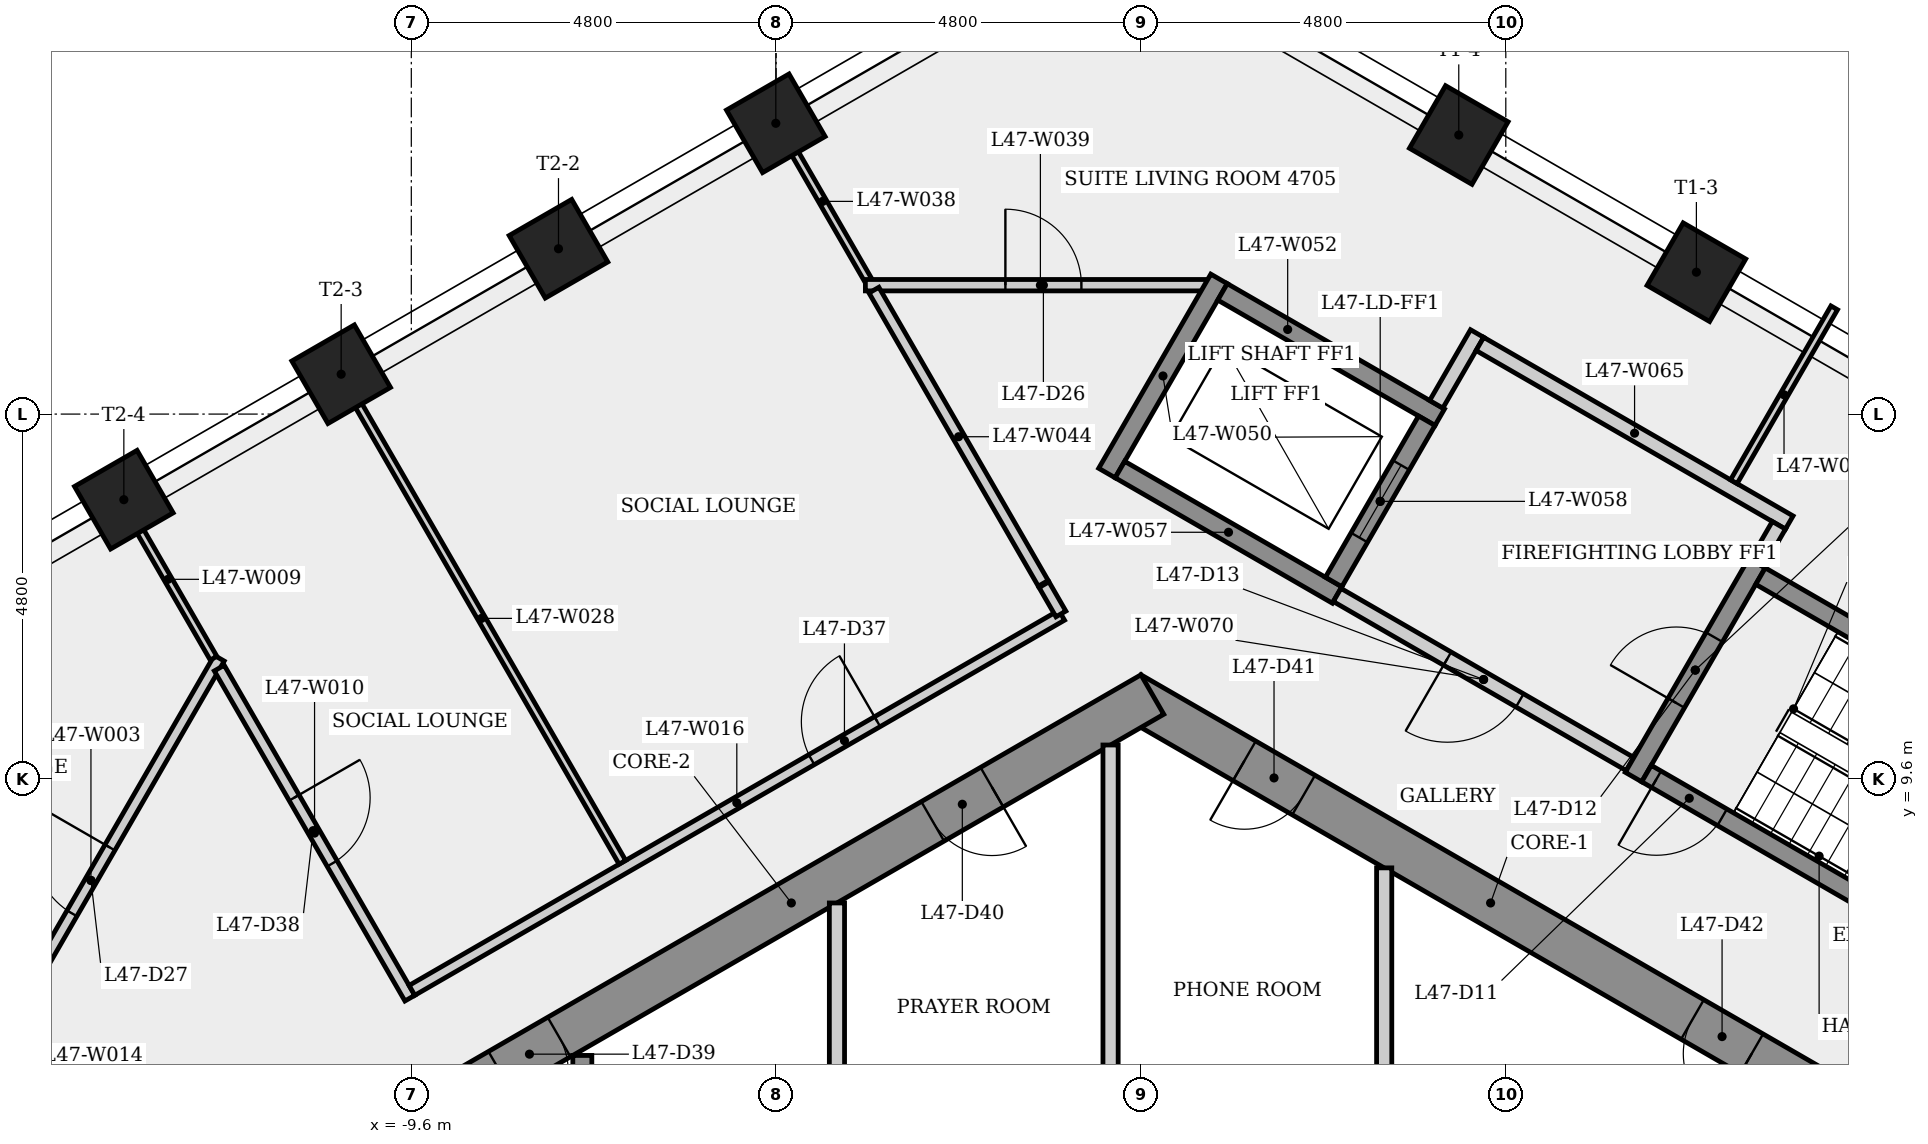
"""IFC4 building model, lengths in metres.
Left out: names, types, materials, properties, quantities, classifications, styles, units other than length and angle.
Written with IfcOpenShell. Run it as: python <this file> out.ifc"""

import sys

from ifc_helpers import new_model, si_unit, direction, frame, frame_2d, origin, origin_2d, place, context, subcontext, project, spatial, rectangle, extrude, element, fill, save


model = new_model("IFC4")
c1 = context("Model", 3, precision=1e-05, world=origin(), true_north=direction((0.0, 1.0)))
c2 = subcontext(c1, "Body", "Model", "MODEL_VIEW")
j1 = project(units=[si_unit("LENGTHUNIT", "METRE"), si_unit("PLANEANGLEUNIT", "RADIAN")], contexts=[c1])
p1 = place(None, origin())
s1 = spatial("IfcSite", under=j1, at=p1, CompositionType="ELEMENT")
p2 = place(p1, origin())
s2 = spatial("IfcBuilding", under=s1, at=p2, CompositionType="ELEMENT")
p3 = place(p2, frame((0.0, 0.0, 176.5)))
s3 = spatial("IfcBuildingStorey", under=s2, at=p3, CompositionType="ELEMENT", Elevation=176.5)
p4 = place(p3, frame((9.35, 5.225, 0.0), z_axis=(0.0, 0.0, 1.0), x_axis=(-0.866023993627, 0.500002442456, 0.0)))
e1 = element("IfcWall", 1, at=p4, inside=s3, PredefinedType="SHEAR", context=c2, shape_type="SweptSolid", body=[
    extrude(rectangle(XDim=10.97, YDim=0.6, at=frame_2d((5.485, 0.0))), origin(), (0.0, 0.0, 1.0), 3.4),
])
p5 = place(p4, frame((8.325, 0.0, 0.0)))
e2 = element("IfcOpeningElement", 2, at=p5, cuts=e1, PredefinedType="OPENING", context=c2, shape_type="SweptSolid", body=[
    extrude(rectangle(XDim=0.9, YDim=2.1, at=frame_2d((0.45, 1.05))), frame((0.0, 0.31, 0.0), z_axis=(0.0, -1.0, 0.0), x_axis=(1.0, 0.0, 0.0)), (0.0, 0.0, 1.0), 0.62),
])
p6 = place(p4, frame((1.518, 0.0, 0.0)))
e3 = element("IfcOpeningElement", 3, at=p6, cuts=e1, PredefinedType="OPENING", context=c2, shape_type="SweptSolid", body=[
    extrude(rectangle(XDim=0.9, YDim=2.1, at=frame_2d((0.45, 1.05))), frame((0.0, 0.31, 0.0), z_axis=(0.0, -1.0, 0.0), x_axis=(1.0, 0.0, 0.0)), (0.0, 0.0, 1.0), 0.62),
])
p7 = place(p3, frame((0.15, 10.71, 0.0), z_axis=(0.0, 0.0, 1.0), x_axis=(-0.866023993627, -0.500002442456, 0.0)))
e4 = element("IfcWall", 4, at=p7, inside=s3, PredefinedType="SHEAR", context=c2, shape_type="SweptSolid", body=[
    extrude(rectangle(XDim=10.97, YDim=0.6, at=frame_2d((5.485, 0.0))), origin(), (0.0, 0.0, 1.0), 3.4),
])
p8 = place(p7, frame((9.013, 0.0, 0.0)))
e5 = element("IfcOpeningElement", 5, at=p8, cuts=e4, PredefinedType="OPENING", context=c2, shape_type="SweptSolid", body=[
    extrude(rectangle(XDim=0.9, YDim=2.1, at=frame_2d((0.45, 1.05))), frame((0.0, 0.31, 0.0), z_axis=(0.0, -1.0, 0.0), x_axis=(1.0, 0.0, 0.0)), (0.0, 0.0, 1.0), 0.62),
])
p9 = place(p7, frame((2.437, 0.0, 0.0)))
e6 = element("IfcOpeningElement", 6, at=p9, cuts=e4, PredefinedType="OPENING", context=c2, shape_type="SweptSolid", body=[
    extrude(rectangle(XDim=0.9, YDim=2.1, at=frame_2d((0.45, 1.05))), frame((0.0, 0.31, 0.0), z_axis=(0.0, -1.0, 0.0), x_axis=(1.0, 0.0, 0.0)), (0.0, 0.0, 1.0), 0.62),
])
for number, where, z_axis, x_axis in (
    (7, (7.308, 16.267, 0.0), (0.0, 0.0, 1.0), (0.5, 0.866, 0.0)),
    (8, (4.181, 18.072, 0.0), (0.0, 0.0, 1.0), (0.5, 0.866, 0.0)),
    (9, (-4.804, 18.226, 0.0), (0.0, 0.0, 1.0), (-0.5, 0.866, 0.0)),
    (10, (-7.664, 16.575, 0.0), (0.0, 0.0, 1.0), (-0.5, 0.866, 0.0)),
    (11, (-10.523, 14.925, 0.0), (0.0, 0.0, 1.0), (-0.5, 0.866, 0.0)),
    (12, (-13.382, 13.274, 0.0), (0.0, 0.0, 1.0), (-0.5, 0.866, 0.0)),
):
    element("IfcColumn", number, at=place(p3, frame(where, z_axis=z_axis, x_axis=x_axis)), inside=s3, PredefinedType="COLUMN", context=c2, shape_type="SweptSolid", body=[
        extrude(rectangle(XDim=0.95, YDim=0.95, at=origin_2d()), origin(), (0.0, 0.0, 1.0), 3.4),
    ])
p10 = place(p3, frame((-15.503, 5.34, 0.0), z_axis=(0.0, 0.0, 1.0), x_axis=(0.499988457423, 0.866032067792, 0.0)))
e13 = element("IfcWall", 13, at=p10, inside=s3, PredefinedType="PARTITIONING", context=c2, shape_type="SweptSolid", body=[
    extrude(rectangle(XDim=6.753, YDim=0.15, at=frame_2d((3.376, 0.0))), origin(), (0.0, 0.0, 1.0), 3.05),
])
p11 = place(p10, frame((2.876, 0.0, 0.0)))
e14 = element("IfcOpeningElement", 14, at=p11, cuts=e13, PredefinedType="OPENING", context=c2, shape_type="SweptSolid", body=[
    extrude(rectangle(XDim=1.0, YDim=2.1, at=frame_2d((0.5, 1.05))), frame((0.0, 0.085, 0.0), z_axis=(0.0, -1.0, 0.0), x_axis=(1.0, 0.0, 0.0)), (0.0, 0.0, 1.0), 0.17),
])
p12 = place(p3, frame((-13.4, 13.263, 0.0), z_axis=(0.0, 0.0, 1.0), x_axis=(0.499995825336, -0.866027814014, 0.0)))
e15 = element("IfcWall", 15, at=p12, inside=s3, PredefinedType="PARTITIONING", context=c2, shape_type="SweptSolid", body=[
    extrude(rectangle(XDim=2.396, YDim=0.1, at=frame_2d((1.198, 0.0))), origin(), (0.0, 0.0, 1.0), 3.05),
])
p13 = place(p3, frame((-12.127, 11.058, 0.0), z_axis=(0.0, 0.0, 1.0), x_axis=(0.500018842284, -0.866014524914, 0.0)))
e16 = element("IfcWall", 16, at=p13, inside=s3, PredefinedType="PARTITIONING", context=c2, shape_type="SweptSolid", body=[
    extrude(rectangle(XDim=5.015, YDim=0.15, at=frame_2d((2.507, 0.0))), origin(), (0.0, 0.0, 1.0), 3.05),
])
p14 = place(p13, frame((1.97, 0.0, 0.0)))
e17 = element("IfcOpeningElement", 17, at=p14, cuts=e16, PredefinedType="OPENING", context=c2, shape_type="SweptSolid", body=[
    extrude(rectangle(XDim=1.0, YDim=2.1, at=frame_2d((0.5, 1.05))), frame((0.0, 0.085, 0.0), z_axis=(0.0, -1.0, 0.0), x_axis=(1.0, 0.0, 0.0)), (0.0, 0.0, 1.0), 0.17),
])
p15 = place(p3, frame((-9.592, 6.817, 0.0), z_axis=(0.0, 0.0, 1.0), x_axis=(0.866024543535, 0.500001489993, 0.0)))
e18 = element("IfcWall", 18, at=p15, inside=s3, PredefinedType="PARTITIONING", context=c2, shape_type="SweptSolid", body=[
    extrude(rectangle(XDim=9.871, YDim=0.15, at=frame_2d((4.936, 0.0))), origin(), (0.0, 0.0, 1.0), 3.05),
])
p16 = place(p15, frame((6.071, 0.0, 0.0)))
e19 = element("IfcOpeningElement", 19, at=p16, cuts=e18, PredefinedType="OPENING", context=c2, shape_type="SweptSolid", body=[
    extrude(rectangle(XDim=1.0, YDim=2.1, at=frame_2d((0.5, 1.05))), frame((0.0, 0.085, 0.0), z_axis=(0.0, -1.0, 0.0), x_axis=(1.0, 0.0, 0.0)), (0.0, 0.0, 1.0), 0.17),
])
p17 = place(p3, frame((-7.35, 1.925, 0.0), z_axis=(0.0, 0.0, 1.0), x_axis=(0.0, 1.0, 0.0)))
e20 = element("IfcWall", 20, at=p17, inside=s3, PredefinedType="SHEAR", context=c2, shape_type="SweptSolid", body=[
    extrude(rectangle(XDim=4.036, YDim=0.25, at=frame_2d((2.018, 0.0))), origin(), (0.0, 0.0, 1.0), 3.05),
])
p18 = place(p3, frame((-6.823, 8.503, 0.0), z_axis=(0.0, 0.0, 1.0), x_axis=(-0.500011399757, 0.866018822032, 0.0)))
e21 = element("IfcWall", 21, at=p18, inside=s3, PredefinedType="PARTITIONING", context=c2, shape_type="SweptSolid", body=[
    extrude(rectangle(XDim=7.411, YDim=0.1, at=frame_2d((3.706, 0.0))), origin(), (0.0, 0.0, 1.0), 3.05),
])
p19 = place(p3, frame((-4.0, 7.967, 0.0), z_axis=(0.0, 0.0, 1.0), x_axis=(0.0, -1.0, 0.0)))
e22 = element("IfcWall", 22, at=p19, inside=s3, PredefinedType="PARTITIONING", context=c2, shape_type="SweptSolid", body=[
    extrude(rectangle(XDim=2.692, YDim=0.2, at=frame_2d((1.346, 0.0))), origin(), (0.0, 0.0, 1.0), 3.05),
])
p20 = place(p3, frame((-3.588, 16.161, 0.0), z_axis=(0.0, 0.0, 1.0), x_axis=(-0.499951716245, 0.866053278629, 0.0)))
e23 = element("IfcWall", 23, at=p20, inside=s3, PredefinedType="PARTITIONING", context=c2, shape_type="SweptSolid", body=[
    extrude(rectangle(XDim=2.397, YDim=0.1, at=frame_2d((1.198, 0.0))), origin(), (0.0, 0.0, 1.0), 3.05),
])
p21 = place(p3, frame((-3.626, 16.096, 0.0), z_axis=(0.0, 0.0, 1.0), x_axis=(1.0, 0.0, 0.0)))
e24 = element("IfcWall", 24, at=p21, inside=s3, PredefinedType="PARTITIONING", context=c2, shape_type="SweptSolid", body=[
    extrude(rectangle(XDim=4.605, YDim=0.15, at=frame_2d((2.302, 0.0))), origin(), (0.0, 0.0, 1.0), 3.05),
])
p22 = place(p21, frame((1.842, 0.0, 0.0)))
e25 = element("IfcOpeningElement", 25, at=p22, cuts=e24, PredefinedType="OPENING", context=c2, shape_type="SweptSolid", body=[
    extrude(rectangle(XDim=1.0, YDim=2.1, at=frame_2d((0.5, 1.05))), frame((0.0, 0.085, 0.0), z_axis=(0.0, -1.0, 0.0), x_axis=(1.0, 0.0, 0.0)), (0.0, 0.0, 1.0), 0.17),
])
p23 = place(p3, frame((-1.286, 12.173, 0.0), z_axis=(0.0, 0.0, 1.0), x_axis=(-0.499988122821, 0.866032260968, 0.0)))
e26 = element("IfcWall", 26, at=p23, inside=s3, PredefinedType="PARTITIONING", context=c2, shape_type="SweptSolid", body=[
    extrude(rectangle(XDim=4.455, YDim=0.15, at=frame_2d((2.227, 0.0))), origin(), (0.0, 0.0, 1.0), 3.05),
])
p24 = place(p3, frame((-1.276, 12.156, 0.0), z_axis=(0.0, 0.0, 1.0), x_axis=(0.500387287287, -0.865801687872, 0.0)))
e27 = element("IfcWall", 27, at=p24, inside=s3, PredefinedType="PARTITIONING", context=c2, shape_type="SweptSolid", body=[
    extrude(rectangle(XDim=0.445, YDim=0.15, at=frame_2d((0.223, 0.0))), origin(), (0.0, 0.0, 1.0), 3.05),
])
p25 = place(p3, frame((-0.4, 10.046, 0.0), z_axis=(0.0, 0.0, 1.0), x_axis=(0.0, -1.0, 0.0)))
e28 = element("IfcWall", 28, at=p25, inside=s3, PredefinedType="PARTITIONING", context=c2, shape_type="SweptSolid", body=[
    extrude(rectangle(XDim=4.771, YDim=0.2, at=frame_2d((2.385, 0.0))), origin(), (0.0, 0.0, 1.0), 3.05),
])
p26 = place(p3, frame((-0.448, 13.624, 0.0), z_axis=(0.0, 0.0, 1.0), x_axis=(0.500037662692, 0.866003658127, 0.0)))
e29 = element("IfcWall", 29, at=p26, inside=s3, PredefinedType="SHEAR", context=c2, shape_type="SweptSolid", body=[
    extrude(rectangle(XDim=2.95, YDim=0.25, at=frame_2d((1.475, 0.0))), origin(), (0.0, 0.0, 1.0), 3.05),
])
for number, where, z_axis, x_axis in (
    (30, (1.073, 16.008, 0.0), (0.0, 0.0, 1.0), (0.866, -0.5, 0.0)),
    (31, (2.581, 12.02, 0.0), (0.0, 0.0, 1.0), (-0.866, 0.5, 0.0)),
):
    element("IfcWall", number, at=place(p3, frame(where, z_axis=z_axis, x_axis=x_axis)), inside=s3, PredefinedType="SHEAR", context=c2, shape_type="SweptSolid", body=[
        extrude(rectangle(XDim=3.3, YDim=0.25, at=frame_2d((1.65, 0.0))), origin(), (0.0, 0.0, 1.0), 3.05),
    ])
p27 = place(p3, frame((2.535, 12.191, 0.0), z_axis=(0.0, 0.0, 1.0), x_axis=(0.500061746146, 0.865989751695, 0.0)))
e32 = element("IfcWall", 32, at=p27, inside=s3, PredefinedType="SHEAR", context=c2, shape_type="SweptSolid", body=[
    extrude(rectangle(XDim=2.45, YDim=0.25, at=frame_2d((1.225, 0.0))), origin(), (0.0, 0.0, 1.0), 3.4),
])
p28 = place(p27, frame((0.675, 0.0, 0.0)))
e33 = element("IfcOpeningElement", 33, at=p28, cuts=e32, PredefinedType="OPENING", context=c2, shape_type="SweptSolid", body=[
    extrude(rectangle(XDim=1.1, YDim=2.1, at=frame_2d((0.55, 1.05))), frame((0.0, 0.135, 0.0), z_axis=(0.0, -1.0, 0.0), x_axis=(1.0, 0.0, 0.0)), (0.0, 0.0, 1.0), 0.27),
])
p29 = place(p3, frame((3.2, 8.429, 0.0), z_axis=(0.0, 0.0, 1.0), x_axis=(0.0, -1.0, 0.0)))
e34 = element("IfcWall", 34, at=p29, inside=s3, PredefinedType="PARTITIONING", context=c2, shape_type="SweptSolid", body=[
    extrude(rectangle(XDim=3.154, YDim=0.2, at=frame_2d((1.577, 0.0))), origin(), (0.0, 0.0, 1.0), 3.05),
])
p30 = place(p3, frame((3.885, 14.529, 0.0), z_axis=(0.0, 0.0, 1.0), x_axis=(0.499997628298, 0.866026773083, 0.0)))
e35 = element("IfcWall", 35, at=p30, inside=s3, PredefinedType="PARTITIONING", context=c2, shape_type="SweptSolid", body=[
    extrude(rectangle(XDim=1.075, YDim=0.2, at=frame_2d((0.538, 0.0))), origin(), (0.0, 0.0, 1.0), 3.05),
])
p31 = place(p3, frame((4.459, 15.323, 0.0), z_axis=(0.0, 0.0, 1.0), x_axis=(0.866016039709, -0.500016218704, 0.0)))
e36 = element("IfcWall", 36, at=p31, inside=s3, PredefinedType="PARTITIONING", context=c2, shape_type="SweptSolid", body=[
    extrude(rectangle(XDim=4.7, YDim=0.2, at=frame_2d((2.35, 0.0))), origin(), (0.0, 0.0, 1.0), 3.05),
])
p32 = place(p3, frame((6.435, 9.795, 0.0), z_axis=(0.0, 0.0, 1.0), x_axis=(-0.866012907634, 0.500021643343, 0.0)))
e37 = element("IfcWall", 37, at=p32, inside=s3, PredefinedType="PARTITIONING", context=c2, shape_type="SweptSolid", body=[
    extrude(rectangle(XDim=4.45, YDim=0.2, at=frame_2d((2.225, 0.0))), origin(), (0.0, 0.0, 1.0), 3.05),
])
p33 = place(p32, frame((1.675, 0.0, 0.0)))
e38 = element("IfcOpeningElement", 38, at=p33, cuts=e37, PredefinedType="OPENING", context=c2, shape_type="SweptSolid", body=[
    extrude(rectangle(XDim=1.1, YDim=2.1, at=frame_2d((0.55, 1.05))), frame((0.0, 0.11, 0.0), z_axis=(0.0, -1.0, 0.0), x_axis=(1.0, 0.0, 0.0)), (0.0, 0.0, 1.0), 0.22),
])
p34 = place(p3, frame((6.48, 9.624, 0.0), z_axis=(0.0, 0.0, 1.0), x_axis=(0.500017246033, 0.866015446554, 0.0)))
e39 = element("IfcWall", 39, at=p34, inside=s3, PredefinedType="SHEAR", context=c2, shape_type="SweptSolid", body=[
    extrude(rectangle(XDim=3.25, YDim=0.25, at=frame_2d((1.625, 0.0))), origin(), (0.0, 0.0, 1.0), 3.05),
])
p35 = place(p34, frame((1.125, 0.0, 0.0)))
e40 = element("IfcOpeningElement", 40, at=p35, cuts=e39, PredefinedType="OPENING", context=c2, shape_type="SweptSolid", body=[
    extrude(rectangle(XDim=1.0, YDim=2.1, at=frame_2d((0.5, 1.05))), frame((0.0, 0.135, 0.0), z_axis=(0.0, -1.0, 0.0), x_axis=(1.0, 0.0, 0.0)), (0.0, 0.0, 1.0), 0.27),
])
p36 = place(p3, frame((7.8, 13.51, 0.0), z_axis=(0.0, 0.0, 1.0), x_axis=(0.50000507839, 0.866022471755, 0.0)))
e41 = element("IfcWall", 41, at=p36, inside=s3, PredefinedType="PARTITIONING", context=c2, shape_type="SweptSolid", body=[
    extrude(rectangle(XDim=2.642, YDim=0.1, at=frame_2d((1.321, 0.0))), origin(), (0.0, 0.0, 1.0), 3.05),
])
p37 = place(p3, frame((8.151, 12.268, 0.0), z_axis=(0.0, 0.0, 1.0), x_axis=(0.866025499775, -0.499999833739, 0.0)))
e42 = element("IfcWall", 42, at=p37, inside=s3, PredefinedType="SHEAR", context=c2, shape_type="SweptSolid", body=[
    extrude(rectangle(XDim=6.4, YDim=0.25, at=frame_2d((3.2, 0.0))), origin(), (0.0, 0.0, 1.0), 3.05),
])
p38 = place(p3, frame((8.393, 12.937, 0.0), z_axis=(0.0, 0.0, 1.0), x_axis=(-0.500065409566, -0.86598763626, 0.0)))
e43 = element("IfcWall", 43, at=p38, inside=s3, PredefinedType="PARTITIONING", context=c2, shape_type="SweptSolid", body=[
    extrude(rectangle(XDim=0.575, YDim=0.2, at=frame_2d((0.288, 0.0))), origin(), (0.0, 0.0, 1.0), 3.05),
])
p39 = place(p3, frame((12.194, 6.47, 0.0), z_axis=(0.0, 0.0, 1.0), x_axis=(-0.866025499775, 0.499999833739, 0.0)))
e44 = element("IfcWall", 44, at=p39, inside=s3, PredefinedType="SHEAR", context=c2, shape_type="SweptSolid", body=[
    extrude(rectangle(XDim=6.4, YDim=0.25, at=frame_2d((3.2, 0.0))), origin(), (0.0, 0.0, 1.0), 3.05),
])
p40 = place(p39, frame((5.25, 0.0, 0.0)))
e45 = element("IfcOpeningElement", 45, at=p40, cuts=e44, PredefinedType="OPENING", context=c2, shape_type="SweptSolid", body=[
    extrude(rectangle(XDim=1.0, YDim=2.1, at=frame_2d((0.5, 1.05))), frame((0.0, 0.135, 0.0), z_axis=(0.0, -1.0, 0.0), x_axis=(1.0, 0.0, 0.0)), (0.0, 0.0, 1.0), 0.27),
])
p41 = place(p40, origin())
e46 = element("IfcDoor", 46, at=p41, inside=s3, OperationType="SINGLE_SWING_RIGHT", PredefinedType="DOOR", context=c2, shape_type="SweptSolid", body=[
    extrude(rectangle(XDim=1.0, YDim=2.1, at=frame_2d((0.5, 1.05))), frame((0.0, 0.025, 0.0), z_axis=(0.0, -1.0, 0.0), x_axis=(1.0, 0.0, 0.0)), (0.0, 0.0, 1.0), 0.05),
])
fill(e45, e46)
p42 = place(p35, origin())
e47 = element("IfcDoor", 47, at=p42, inside=s3, OperationType="SINGLE_SWING_LEFT", PredefinedType="DOOR", context=c2, shape_type="SweptSolid", body=[
    extrude(rectangle(XDim=1.0, YDim=2.1, at=frame_2d((0.5, 1.05))), frame((0.0, 0.025, 0.0), z_axis=(0.0, -1.0, 0.0), x_axis=(1.0, 0.0, 0.0)), (0.0, 0.0, 1.0), 0.05),
])
fill(e40, e47)
p43 = place(p33, origin())
e48 = element("IfcDoor", 48, at=p43, inside=s3, OperationType="SINGLE_SWING_RIGHT", PredefinedType="DOOR", context=c2, shape_type="SweptSolid", body=[
    extrude(rectangle(XDim=1.1, YDim=2.1, at=frame_2d((0.55, 1.05))), frame((0.0, 0.025, 0.0), z_axis=(0.0, -1.0, 0.0), x_axis=(1.0, 0.0, 0.0)), (0.0, 0.0, 1.0), 0.05),
])
fill(e38, e48)
p44 = place(p28, origin())
e49 = element("IfcDoor", 49, at=p44, inside=s3, OperationType="SLIDING_TO_LEFT", PredefinedType="DOOR", context=c2, shape_type="SweptSolid", body=[
    extrude(rectangle(XDim=1.1, YDim=2.1, at=frame_2d((0.55, 1.05))), frame((0.0, 0.025, 0.0), z_axis=(0.0, -1.0, 0.0), x_axis=(1.0, 0.0, 0.0)), (0.0, 0.0, 1.0), 0.05),
])
fill(e33, e49)
p45 = place(p22, origin())
e50 = element("IfcDoor", 50, at=p45, inside=s3, OperationType="SINGLE_SWING_LEFT", PredefinedType="DOOR", context=c2, shape_type="SweptSolid", body=[
    extrude(rectangle(XDim=1.0, YDim=2.1, at=frame_2d((0.5, 1.05))), frame((0.0, 0.025, 0.0), z_axis=(0.0, -1.0, 0.0), x_axis=(1.0, 0.0, 0.0)), (0.0, 0.0, 1.0), 0.05),
])
fill(e25, e50)
p46 = place(p11, origin())
e51 = element("IfcDoor", 51, at=p46, inside=s3, OperationType="SINGLE_SWING_RIGHT", PredefinedType="DOOR", context=c2, shape_type="SweptSolid", body=[
    extrude(rectangle(XDim=1.0, YDim=2.1, at=frame_2d((0.5, 1.05))), frame((0.0, 0.025, 0.0), z_axis=(0.0, -1.0, 0.0), x_axis=(1.0, 0.0, 0.0)), (0.0, 0.0, 1.0), 0.05),
])
fill(e14, e51)
p47 = place(p16, origin())
e52 = element("IfcDoor", 52, at=p47, inside=s3, OperationType="SINGLE_SWING_RIGHT", PredefinedType="DOOR", context=c2, shape_type="SweptSolid", body=[
    extrude(rectangle(XDim=1.0, YDim=2.1, at=frame_2d((0.5, 1.05))), frame((0.0, 0.025, 0.0), z_axis=(0.0, -1.0, 0.0), x_axis=(1.0, 0.0, 0.0)), (0.0, 0.0, 1.0), 0.05),
])
fill(e19, e52)
p48 = place(p14, origin())
e53 = element("IfcDoor", 53, at=p48, inside=s3, OperationType="SINGLE_SWING_LEFT", PredefinedType="DOOR", context=c2, shape_type="SweptSolid", body=[
    extrude(rectangle(XDim=1.0, YDim=2.1, at=frame_2d((0.5, 1.05))), frame((0.0, 0.025, 0.0), z_axis=(0.0, -1.0, 0.0), x_axis=(1.0, 0.0, 0.0)), (0.0, 0.0, 1.0), 0.05),
])
fill(e17, e53)
p49 = place(p8, origin())
e54 = element("IfcDoor", 54, at=p49, inside=s3, OperationType="SINGLE_SWING_RIGHT", PredefinedType="DOOR", context=c2, shape_type="SweptSolid", body=[
    extrude(rectangle(XDim=0.9, YDim=2.1, at=frame_2d((0.45, 1.05))), frame((0.0, 0.025, 0.0), z_axis=(0.0, -1.0, 0.0), x_axis=(1.0, 0.0, 0.0)), (0.0, 0.0, 1.0), 0.05),
])
fill(e5, e54)
p50 = place(p9, origin())
e55 = element("IfcDoor", 55, at=p50, inside=s3, OperationType="SINGLE_SWING_LEFT", PredefinedType="DOOR", context=c2, shape_type="SweptSolid", body=[
    extrude(rectangle(XDim=0.9, YDim=2.1, at=frame_2d((0.45, 1.05))), frame((0.0, 0.025, 0.0), z_axis=(0.0, -1.0, 0.0), x_axis=(1.0, 0.0, 0.0)), (0.0, 0.0, 1.0), 0.05),
])
fill(e6, e55)
p51 = place(p5, origin())
e56 = element("IfcDoor", 56, at=p51, inside=s3, OperationType="SINGLE_SWING_RIGHT", PredefinedType="DOOR", context=c2, shape_type="SweptSolid", body=[
    extrude(rectangle(XDim=0.9, YDim=2.1, at=frame_2d((0.45, 1.05))), frame((0.0, 0.025, 0.0), z_axis=(0.0, -1.0, 0.0), x_axis=(1.0, 0.0, 0.0)), (0.0, 0.0, 1.0), 0.05),
])
fill(e2, e56)
p52 = place(p6, origin())
e57 = element("IfcDoor", 57, at=p52, inside=s3, OperationType="SINGLE_SWING_LEFT", PredefinedType="DOOR", context=c2, shape_type="SweptSolid", body=[
    extrude(rectangle(XDim=0.9, YDim=2.1, at=frame_2d((0.45, 1.05))), frame((0.0, 0.025, 0.0), z_axis=(0.0, -1.0, 0.0), x_axis=(1.0, 0.0, 0.0)), (0.0, 0.0, 1.0), 0.05),
])
fill(e3, e57)
save(model, sys.argv[1])
